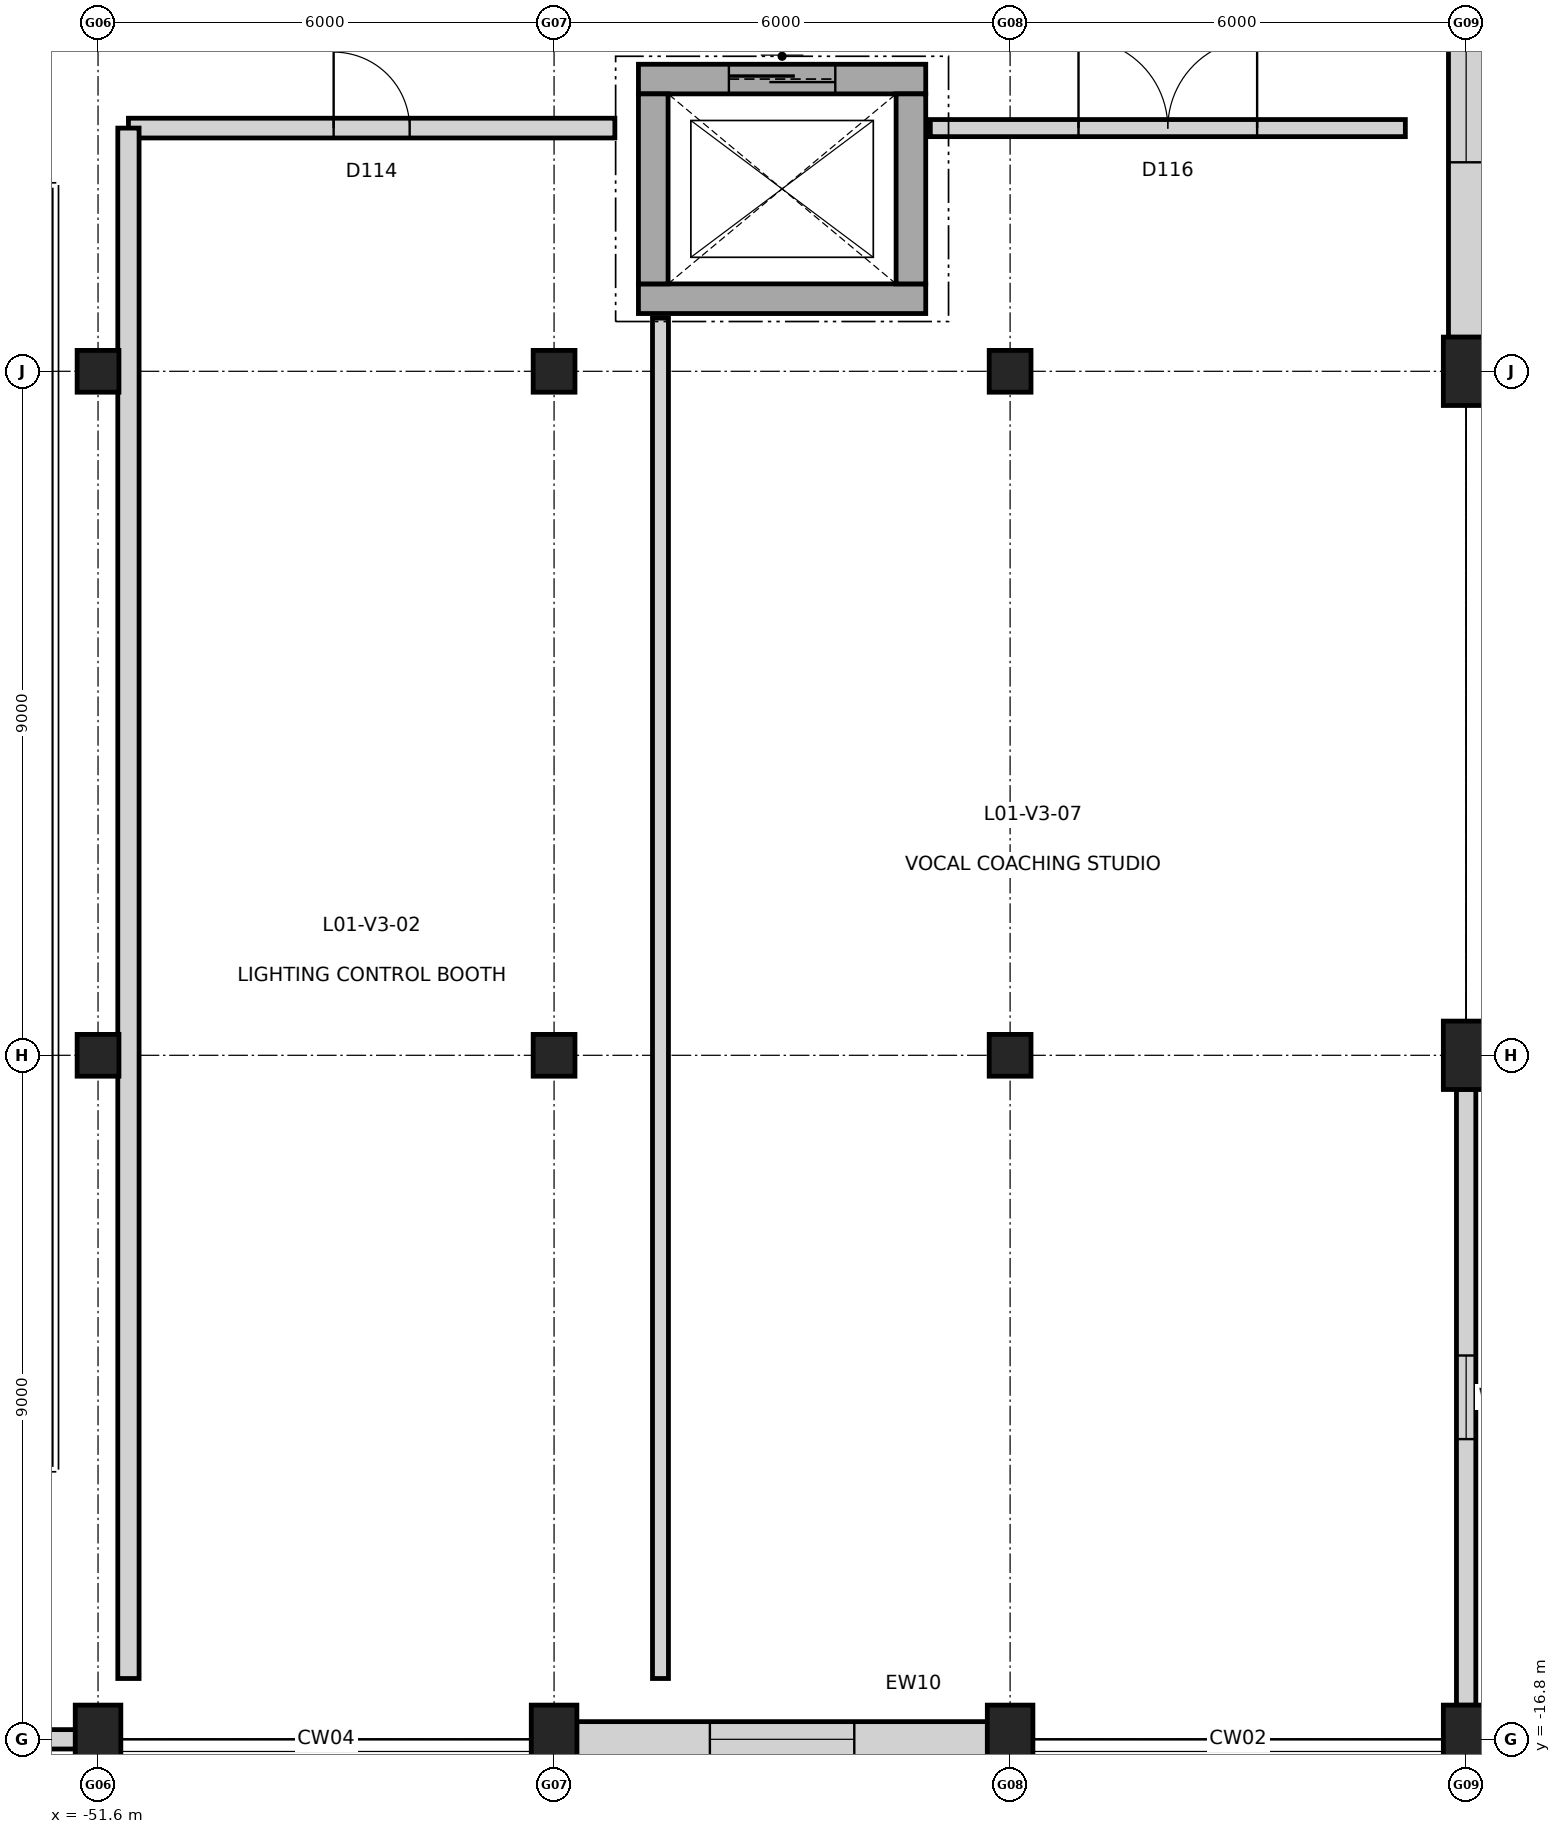
"""IFC4 building model, lengths in metres.
Left out: names, types, materials, properties, quantities, classifications, styles, units other than length and angle.
Written with IfcOpenShell. Run it as: python <this file> out.ifc"""

import sys

from ifc_helpers import new_model, si_unit, direction, frame, frame_2d, origin, origin_2d, place, context, subcontext, project, spatial, rectangle, extrude, element, fill, save


model = new_model("IFC4")
c1 = context("Model", 3, precision=1e-05, world=origin(), true_north=direction((0.0, 1.0)))
c2 = subcontext(c1, "Body", "Model", "MODEL_VIEW")
j1 = project(units=[si_unit("LENGTHUNIT", "METRE"), si_unit("PLANEANGLEUNIT", "RADIAN")], contexts=[c1])
p1 = place(None, origin())
s1 = spatial("IfcSite", under=j1, at=p1, CompositionType="ELEMENT")
p2 = place(p1, origin())
s2 = spatial("IfcBuilding", under=s1, at=p2, CompositionType="ELEMENT")
p3 = place(p2, frame((0.0, 0.0, 5.4)))
s3 = spatial("IfcBuildingStorey", under=s2, at=p3, CompositionType="ELEMENT", Elevation=5.4)
p4 = place(p3, frame((-51.6, -16.8, 0.0), z_axis=(0.0, 0.0, 1.0), x_axis=(1.0, 0.0, 0.0)))
e1 = element("IfcColumn", 1, at=p4, inside=s3, PredefinedType="COLUMN", context=c2, shape_type="SweptSolid", body=[
    extrude(rectangle(XDim=0.6, YDim=0.9, at=origin_2d()), origin(), (0.0, 0.0, 1.0), 4.8),
])
for number, where, z_axis, x_axis in (
    (2, (-51.6, -7.8, 0.0), (0.0, 0.0, 1.0), (1.0, 0.0, 0.0)),
    (3, (-51.6, 1.2, 0.0), (0.0, 0.0, 1.0), (1.0, 0.0, 0.0)),
):
    element("IfcColumn", number, at=place(p3, frame(where, z_axis=z_axis, x_axis=x_axis)), inside=s3, PredefinedType="COLUMN", context=c2, shape_type="SweptSolid", body=[
        extrude(rectangle(XDim=0.55, YDim=0.55, at=origin_2d()), origin(), (0.0, 0.0, 1.0), 4.8),
    ])
p5 = place(p3, frame((-45.6, -16.8, 0.0), z_axis=(0.0, 0.0, 1.0), x_axis=(1.0, 0.0, 0.0)))
e4 = element("IfcColumn", 4, at=p5, inside=s3, PredefinedType="COLUMN", context=c2, shape_type="SweptSolid", body=[
    extrude(rectangle(XDim=0.6, YDim=0.9, at=origin_2d()), origin(), (0.0, 0.0, 1.0), 4.8),
])
for number, where, z_axis, x_axis in (
    (5, (-45.6, -7.8, 0.0), (0.0, 0.0, 1.0), (1.0, 0.0, 0.0)),
    (6, (-45.6, 1.2, 0.0), (0.0, 0.0, 1.0), (1.0, 0.0, 0.0)),
):
    element("IfcColumn", number, at=place(p3, frame(where, z_axis=z_axis, x_axis=x_axis)), inside=s3, PredefinedType="COLUMN", context=c2, shape_type="SweptSolid", body=[
        extrude(rectangle(XDim=0.55, YDim=0.55, at=origin_2d()), origin(), (0.0, 0.0, 1.0), 4.8),
    ])
p6 = place(p3, frame((-39.6, -16.8, 0.0), z_axis=(0.0, 0.0, 1.0), x_axis=(1.0, 0.0, 0.0)))
e7 = element("IfcColumn", 7, at=p6, inside=s3, PredefinedType="COLUMN", context=c2, shape_type="SweptSolid", body=[
    extrude(rectangle(XDim=0.6, YDim=0.9, at=origin_2d()), origin(), (0.0, 0.0, 1.0), 4.8),
])
for number, where, z_axis, x_axis in (
    (8, (-39.6, -7.8, 0.0), (0.0, 0.0, 1.0), (1.0, 0.0, 0.0)),
    (9, (-39.6, 1.2, 0.0), (0.0, 0.0, 1.0), (1.0, 0.0, 0.0)),
):
    element("IfcColumn", number, at=place(p3, frame(where, z_axis=z_axis, x_axis=x_axis)), inside=s3, PredefinedType="COLUMN", context=c2, shape_type="SweptSolid", body=[
        extrude(rectangle(XDim=0.55, YDim=0.55, at=origin_2d()), origin(), (0.0, 0.0, 1.0), 4.8),
    ])
for number, where, z_axis, x_axis in (
    (10, (-33.6, -16.8, 0.0), (0.0, 0.0, 1.0), (1.0, 0.0, 0.0)),
    (11, (-33.6, -7.8, 0.0), (0.0, 0.0, 1.0), (1.0, 0.0, 0.0)),
    (12, (-33.6, 1.2, 0.0), (0.0, 0.0, 1.0), (1.0, 0.0, 0.0)),
):
    element("IfcColumn", number, at=place(p3, frame(where, z_axis=z_axis, x_axis=x_axis)), inside=s3, PredefinedType="COLUMN", context=c2, shape_type="SweptSolid", body=[
        extrude(rectangle(XDim=0.6, YDim=0.9, at=origin_2d()), origin(), (0.0, 0.0, 1.0), 4.8),
    ])
p7 = place(p3, frame((-39.898, -16.8, 0.0), z_axis=(0.0, 0.0, 1.0), x_axis=(-1.0, 0.0, 0.0)))
e13 = element("IfcWall", 13, at=p7, inside=s3, PredefinedType="STANDARD", context=c2, shape_type="SweptSolid", body=[
    extrude(rectangle(XDim=5.404, YDim=0.465, at=frame_2d((2.702, 0.0))), origin(), (0.0, 0.0, 1.0), 3.74),
])
p8 = place(p7, frame((1.752, 0.0, 0.85)))
e14 = element("IfcOpeningElement", 14, at=p8, cuts=e13, PredefinedType="OPENING", context=c2, shape_type="SweptSolid", body=[
    extrude(rectangle(XDim=1.9, YDim=2.1, at=frame_2d((0.95, 1.05))), frame((0.0, 0.242, 0.0), z_axis=(0.0, -1.0, 0.0), x_axis=(1.0, 0.0, 0.0)), (0.0, 0.0, 1.0), 0.485),
])
p9 = place(p3, frame((-51.898, -16.8, 0.0), z_axis=(0.0, 0.0, 1.0), x_axis=(-1.0, 0.0, 0.0)))
e15 = element("IfcWall", 15, at=p9, inside=s3, PredefinedType="STANDARD", context=c2, shape_type="SweptSolid", body=[
    extrude(rectangle(XDim=5.404, YDim=0.255, at=frame_2d((2.702, 0.0))), origin(), (0.0, 0.0, 1.0), 3.74),
])
p10 = place(p9, frame((1.602, 0.0, 0.85)))
e16 = element("IfcOpeningElement", 16, at=p10, cuts=e15, PredefinedType="OPENING", context=c2, shape_type="SweptSolid", body=[
    extrude(rectangle(XDim=2.2, YDim=2.1, at=frame_2d((1.1, 1.05))), frame((0.0, 0.137, 0.0), z_axis=(0.0, -1.0, 0.0), x_axis=(1.0, 0.0, 0.0)), (0.0, 0.0, 1.0), 0.275),
])
p11 = place(p3, frame((-33.6, 9.752, 0.0), z_axis=(0.0, 0.0, 1.0), x_axis=(0.0, -1.0, 0.0)))
e17 = element("IfcWall", 17, at=p11, inside=s3, PredefinedType="STANDARD", context=c2, shape_type="SweptSolid", body=[
    extrude(rectangle(XDim=8.104, YDim=0.465, at=frame_2d((4.052, 0.0))), origin(), (0.0, 0.0, 1.0), 3.824),
])
p12 = place(p11, frame((2.302, 0.0, 0.85)))
e18 = element("IfcOpeningElement", 18, at=p12, cuts=e17, PredefinedType="OPENING", context=c2, shape_type="SweptSolid", body=[
    extrude(rectangle(XDim=3.5, YDim=1.45, at=frame_2d((1.75, 0.725))), frame((0.0, 0.242, 0.0), z_axis=(0.0, -1.0, 0.0), x_axis=(1.0, 0.0, 0.0)), (0.0, 0.0, 1.0), 0.485),
])
p13 = place(p3, frame((-33.6, -8.248, 0.0), z_axis=(0.0, 0.0, 1.0), x_axis=(0.0, -1.0, 0.0)))
e19 = element("IfcWall", 19, at=p13, inside=s3, PredefinedType="STANDARD", context=c2, shape_type="SweptSolid", body=[
    extrude(rectangle(XDim=8.104, YDim=0.255, at=frame_2d((4.052, 0.0))), origin(), (0.0, 0.0, 1.0), 3.824),
])
p14 = place(p13, frame((3.502, 0.0, 0.85)))
e20 = element("IfcOpeningElement", 20, at=p14, cuts=e19, PredefinedType="OPENING", context=c2, shape_type="SweptSolid", body=[
    extrude(rectangle(XDim=1.1, YDim=1.6, at=frame_2d((0.55, 0.8))), frame((0.0, 0.137, 0.0), z_axis=(0.0, -1.0, 0.0), x_axis=(1.0, 0.0, 0.0)), (0.0, 0.0, 1.0), 0.275),
])
p15 = place(p3, frame((-40.71, 2.155, 0.0), z_axis=(0.0, 0.0, 1.0), x_axis=(-1.0, 0.0, 0.0)))
e21 = element("IfcWall", 21, at=p15, inside=s3, PredefinedType="SHEAR", context=c2, shape_type="SweptSolid", body=[
    extrude(rectangle(XDim=3.78, YDim=0.39, at=frame_2d((1.89, 0.0))), origin(), (0.0, 0.0, 1.0), 4.8),
])
p16 = place(p3, frame((-44.49, 5.045, 0.0), z_axis=(0.0, 0.0, 1.0), x_axis=(1.0, 0.0, 0.0)))
e22 = element("IfcWall", 22, at=p16, inside=s3, PredefinedType="SHEAR", context=c2, shape_type="SweptSolid", body=[
    extrude(rectangle(XDim=3.78, YDim=0.39, at=frame_2d((1.89, 0.0))), origin(), (0.0, 0.0, 1.0), 4.8),
])
p17 = place(p16, frame((1.19, 0.0, 0.0)))
e23 = element("IfcOpeningElement", 23, at=p17, cuts=e22, PredefinedType="OPENING", context=c2, shape_type="SweptSolid", body=[
    extrude(rectangle(XDim=1.4, YDim=2.2, at=frame_2d((0.7, 1.1))), frame((0.0, 0.205, 0.0), z_axis=(0.0, -1.0, 0.0), x_axis=(1.0, 0.0, 0.0)), (0.0, 0.0, 1.0), 0.41),
])
for number, where, z_axis, x_axis in (
    (24, (-44.295, 2.35, 0.0), (0.0, 0.0, 1.0), (0.0, 1.0, 0.0)),
    (25, (-40.905, 4.85, 0.0), (0.0, 0.0, 1.0), (0.0, -1.0, 0.0)),
):
    element("IfcWall", number, at=place(p3, frame(where, z_axis=z_axis, x_axis=x_axis)), inside=s3, PredefinedType="SHEAR", context=c2, shape_type="SweptSolid", body=[
        extrude(rectangle(XDim=2.5, YDim=0.39, at=frame_2d((1.25, 0.0))), origin(), (0.0, 0.0, 1.0), 4.8),
    ])
p18 = place(p3, frame((-51.2, 4.4, 0.0), z_axis=(0.0, 0.0, 1.0), x_axis=(1.0, 0.0, 0.0)))
e26 = element("IfcWall", 26, at=p18, inside=s3, PredefinedType="PARTITIONING", context=c2, shape_type="SweptSolid", body=[
    extrude(rectangle(XDim=6.4, YDim=0.26, at=frame_2d((3.2, 0.0))), origin(), (0.0, 0.0, 1.0), 4.42),
])
p19 = place(p18, frame((2.7, 0.0, 0.0)))
e27 = element("IfcOpeningElement", 27, at=p19, cuts=e26, PredefinedType="OPENING", context=c2, shape_type="SweptSolid", body=[
    extrude(rectangle(XDim=1.0, YDim=2.25, at=frame_2d((0.5, 1.125))), frame((0.0, 0.14, 0.0), z_axis=(0.0, -1.0, 0.0), x_axis=(1.0, 0.0, 0.0)), (0.0, 0.0, 1.0), 0.28),
])
p20 = place(p3, frame((-51.2, -16.0, 0.0), z_axis=(0.0, 0.0, 1.0), x_axis=(0.0, 1.0, 0.0)))
e28 = element("IfcWall", 28, at=p20, inside=s3, PredefinedType="PARTITIONING", context=c2, shape_type="SweptSolid", body=[
    extrude(rectangle(XDim=20.4, YDim=0.28, at=frame_2d((10.2, 0.0))), origin(), (0.0, 0.0, 1.0), 3.685),
])
p21 = place(p3, frame((-40.65, 4.4, 0.0), z_axis=(0.0, 0.0, 1.0), x_axis=(1.0, 0.0, 0.0)))
e29 = element("IfcWall", 29, at=p21, inside=s3, PredefinedType="PARTITIONING", context=c2, shape_type="SweptSolid", body=[
    extrude(rectangle(XDim=6.25, YDim=0.225, at=frame_2d((3.125, 0.0))), origin(), (0.0, 0.0, 1.0), 4.42),
])
p22 = place(p21, frame((1.95, 0.0, 0.0)))
e30 = element("IfcOpeningElement", 30, at=p22, cuts=e29, PredefinedType="OPENING", context=c2, shape_type="SweptSolid", body=[
    extrude(rectangle(XDim=2.35, YDim=2.5, at=frame_2d((1.175, 1.25))), frame((0.0, 0.123, 0.0), z_axis=(0.0, -1.0, 0.0), x_axis=(1.0, 0.0, 0.0)), (0.0, 0.0, 1.0), 0.245),
])
p23 = place(p3, frame((-44.2, -16.0, 0.0), z_axis=(0.0, 0.0, 1.0), x_axis=(0.0, 1.0, 0.0)))
e31 = element("IfcWall", 31, at=p23, inside=s3, PredefinedType="PARTITIONING", context=c2, shape_type="SweptSolid", body=[
    extrude(rectangle(XDim=17.9, YDim=0.21, at=frame_2d((8.95, 0.0))), origin(), (0.0, 0.0, 1.0), 4.42),
])
p24 = place(p8, origin())
e32 = element("IfcWindow", 32, at=p24, inside=s3, PartitioningType="SINGLE_PANEL", PredefinedType="WINDOW", context=c2, shape_type="SweptSolid", body=[
    extrude(rectangle(XDim=1.9, YDim=2.1, at=frame_2d((0.95, 1.05))), frame((0.0, 0.03, 0.0), z_axis=(0.0, -1.0, 0.0), x_axis=(1.0, 0.0, 0.0)), (0.0, 0.0, 1.0), 0.06),
])
fill(e14, e32)
p25 = place(p12, origin())
e33 = element("IfcWindow", 33, at=p25, inside=s3, PartitioningType="SINGLE_PANEL", PredefinedType="WINDOW", context=c2, shape_type="SweptSolid", body=[
    extrude(rectangle(XDim=3.5, YDim=1.45, at=frame_2d((1.75, 0.725))), frame((0.0, 0.03, 0.0), z_axis=(0.0, -1.0, 0.0), x_axis=(1.0, 0.0, 0.0)), (0.0, 0.0, 1.0), 0.06),
])
fill(e18, e33)
p26 = place(p14, origin())
e34 = element("IfcWindow", 34, at=p26, inside=s3, PartitioningType="SINGLE_PANEL", PredefinedType="WINDOW", context=c2, shape_type="SweptSolid", body=[
    extrude(rectangle(XDim=1.1, YDim=1.6, at=frame_2d((0.55, 0.8))), frame((0.0, 0.03, 0.0), z_axis=(0.0, -1.0, 0.0), x_axis=(1.0, 0.0, 0.0)), (0.0, 0.0, 1.0), 0.06),
])
fill(e20, e34)
p27 = place(p17, origin())
e35 = element("IfcDoor", 35, at=p27, inside=s3, OperationType="SLIDING_TO_LEFT", PredefinedType="DOOR", context=c2, shape_type="SweptSolid", body=[
    extrude(rectangle(XDim=1.4, YDim=2.2, at=frame_2d((0.7, 1.1))), frame((0.0, 0.025, 0.0), z_axis=(0.0, -1.0, 0.0), x_axis=(1.0, 0.0, 0.0)), (0.0, 0.0, 1.0), 0.05),
])
fill(e23, e35)
p28 = place(p19, origin())
e36 = element("IfcDoor", 36, at=p28, inside=s3, OperationType="SINGLE_SWING_LEFT", PredefinedType="DOOR", context=c2, shape_type="SweptSolid", body=[
    extrude(rectangle(XDim=1.0, YDim=2.25, at=frame_2d((0.5, 1.125))), frame((0.0, 0.025, 0.0), z_axis=(0.0, -1.0, 0.0), x_axis=(1.0, 0.0, 0.0)), (0.0, 0.0, 1.0), 0.05),
])
fill(e27, e36)
p29 = place(p22, origin())
e37 = element("IfcDoor", 37, at=p29, inside=s3, OperationType="DOUBLE_DOOR_SINGLE_SWING", PredefinedType="DOOR", context=c2, shape_type="SweptSolid", body=[
    extrude(rectangle(XDim=2.35, YDim=2.5, at=frame_2d((1.175, 1.25))), frame((0.0, 0.025, 0.0), z_axis=(0.0, -1.0, 0.0), x_axis=(1.0, 0.0, 0.0)), (0.0, 0.0, 1.0), 0.05),
])
fill(e30, e37)
save(model, sys.argv[1])
